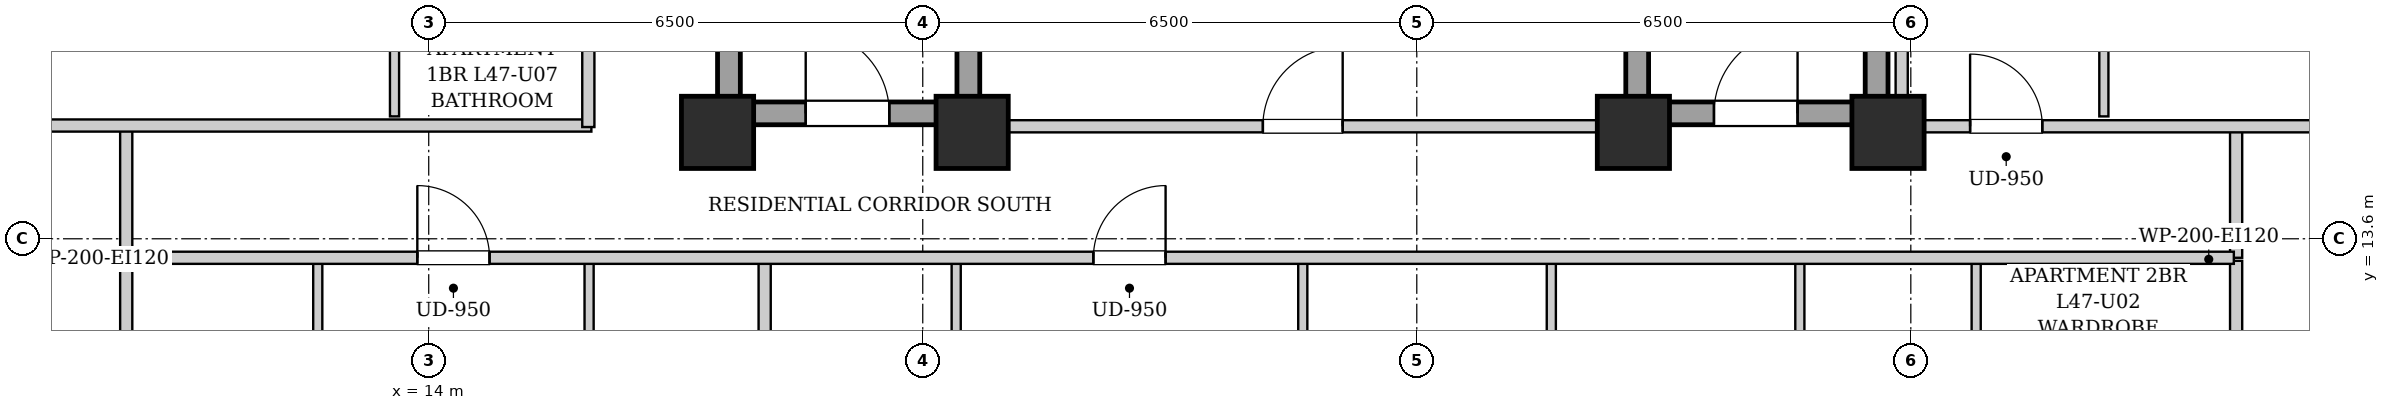
"""IFC4 building model, lengths in metres.
Left out: names, types, materials, properties, quantities, classifications, styles, units other than length and angle.
Written with IfcOpenShell. Run it as: python <this file> out.ifc"""

import sys

from ifc_helpers import new_model, si_unit, direction, frame, frame_2d, origin, origin_2d, place, context, subcontext, project, spatial, rectangle, extrude, element, fill, save


model = new_model("IFC4")
c1 = context("Model", 3, precision=1e-05, world=origin(), true_north=direction((0.0, 1.0)))
c2 = subcontext(c1, "Body", "Model", "MODEL_VIEW")
j1 = project(units=[si_unit("LENGTHUNIT", "METRE"), si_unit("PLANEANGLEUNIT", "RADIAN")], contexts=[c1])
p1 = place(None, origin())
s1 = spatial("IfcSite", under=j1, at=p1, CompositionType="ELEMENT")
p2 = place(p1, origin())
s2 = spatial("IfcBuilding", under=s1, at=p2, CompositionType="ELEMENT")
p3 = place(p2, frame((0.0, 0.0, 163.4)))
s3 = spatial("IfcBuildingStorey", under=s2, at=p3, CompositionType="ELEMENT", Elevation=163.4)
for number, where, z_axis, x_axis in (
    (1, (17.8, 15.0, 0.0), (0.0, 0.0, 1.0), (1.0, 0.0, 0.0)),
    (2, (21.15, 15.0, 0.0), (0.0, 0.0, 1.0), (1.0, 0.0, 0.0)),
    (3, (29.85, 15.0, 0.0), (0.0, 0.0, 1.0), (1.0, 0.0, 0.0)),
    (4, (33.2, 15.0, 0.0), (0.0, 0.0, 1.0), (1.0, 0.0, 0.0)),
):
    element("IfcColumn", number, at=place(p3, frame(where, z_axis=z_axis, x_axis=x_axis)), inside=s3, PredefinedType="COLUMN", context=c2, shape_type="SweptSolid", body=[
        extrude(rectangle(XDim=0.95, YDim=0.95, at=origin_2d()), origin(), (0.0, 0.0, 1.0), 3.25),
    ])
for number, where, z_axis, x_axis in (
    (5, (17.95, 15.1, 0.0), (0.0, 0.0, 1.0), (0.0, 1.0, 0.0)),
    (6, (21.1, 15.1, 0.0), (0.0, 0.0, 1.0), (0.0, 1.0, 0.0)),
):
    element("IfcWall", number, at=place(p3, frame(where, z_axis=z_axis, x_axis=x_axis)), inside=s3, PredefinedType="SHEAR", context=c2, shape_type="SweptSolid", body=[
        extrude(rectangle(XDim=9.0, YDim=0.3, at=frame_2d((4.5, 0.0))), origin(), (0.0, 0.0, 1.0), 2.99),
    ])
p4 = place(p3, frame((18.1, 15.25, 0.0), z_axis=(0.0, 0.0, 1.0), x_axis=(1.0, 0.0, 0.0)))
e7 = element("IfcWall", 7, at=p4, inside=s3, PredefinedType="SHEAR", context=c2, shape_type="SweptSolid", body=[
    extrude(rectangle(XDim=2.85, YDim=0.3, at=frame_2d((1.425, 0.0))), origin(), (0.0, 0.0, 1.0), 2.99),
])
p5 = place(p4, frame((0.86, 0.0, 0.0)))
e8 = element("IfcOpeningElement", 8, at=p5, cuts=e7, PredefinedType="OPENING", context=c2, shape_type="SweptSolid", body=[
    extrude(rectangle(XDim=1.1, YDim=2.05, at=frame_2d((0.55, 1.025))), frame((0.0, 0.16, 0.0), z_axis=(0.0, -1.0, 0.0), x_axis=(1.0, 0.0, 0.0)), (0.0, 0.0, 1.0), 0.32),
])
for number, where, z_axis, x_axis in (
    (9, (29.9, 15.1, 0.0), (0.0, 0.0, 1.0), (0.0, 1.0, 0.0)),
    (10, (33.05, 15.1, 0.0), (0.0, 0.0, 1.0), (0.0, 1.0, 0.0)),
):
    element("IfcWall", number, at=place(p3, frame(where, z_axis=z_axis, x_axis=x_axis)), inside=s3, PredefinedType="SHEAR", context=c2, shape_type="SweptSolid", body=[
        extrude(rectangle(XDim=9.0, YDim=0.3, at=frame_2d((4.5, 0.0))), origin(), (0.0, 0.0, 1.0), 2.99),
    ])
p6 = place(p3, frame((30.05, 15.25, 0.0), z_axis=(0.0, 0.0, 1.0), x_axis=(1.0, 0.0, 0.0)))
e11 = element("IfcWall", 11, at=p6, inside=s3, PredefinedType="SHEAR", context=c2, shape_type="SweptSolid", body=[
    extrude(rectangle(XDim=2.85, YDim=0.3, at=frame_2d((1.425, 0.0))), origin(), (0.0, 0.0, 1.0), 2.99),
])
p7 = place(p6, frame((0.86, 0.0, 0.0)))
e12 = element("IfcOpeningElement", 12, at=p7, cuts=e11, PredefinedType="OPENING", context=c2, shape_type="SweptSolid", body=[
    extrude(rectangle(XDim=1.1, YDim=2.05, at=frame_2d((0.55, 1.025))), frame((0.0, 0.16, 0.0), z_axis=(0.0, -1.0, 0.0), x_axis=(1.0, 0.0, 0.0)), (0.0, 0.0, 1.0), 0.32),
])
p8 = place(p3, frame((21.25, 15.08, 0.0), z_axis=(0.0, 0.0, 1.0), x_axis=(1.0, 0.0, 0.0)))
e13 = element("IfcWall", 13, at=p8, inside=s3, PredefinedType="PARTITIONING", context=c2, shape_type="SweptSolid", body=[
    extrude(rectangle(XDim=8.5, YDim=0.16, at=frame_2d((4.25, 0.0))), origin(), (0.0, 0.0, 1.0), 2.442),
])
p9 = place(p8, frame((3.725, 0.0, 0.0)))
e14 = element("IfcOpeningElement", 14, at=p9, cuts=e13, PredefinedType="OPENING", context=c2, shape_type="SweptSolid", body=[
    extrude(rectangle(XDim=1.05, YDim=2.05, at=frame_2d((0.525, 1.025))), frame((0.0, 0.09, 0.0), z_axis=(0.0, -1.0, 0.0), x_axis=(1.0, 0.0, 0.0)), (0.0, 0.0, 1.0), 0.18),
])
for number, where, z_axis, x_axis in (
    (15, (10.02, 13.35, 0.0), (0.0, 0.0, 1.0), (0.0, 1.0, 0.0)),
    (16, (37.78, 13.35, 0.0), (0.0, 0.0, 1.0), (0.0, 1.0, 0.0)),
):
    element("IfcWall", number, at=place(p3, frame(where, z_axis=z_axis, x_axis=x_axis)), inside=s3, PredefinedType="PARTITIONING", context=c2, shape_type="SweptSolid", body=[
        extrude(rectangle(XDim=1.74, YDim=0.16, at=frame_2d((0.87, 0.0))), origin(), (0.0, 0.0, 1.0), 2.99),
    ])
p10 = place(p3, frame((7.78, 15.09, 0.0), z_axis=(0.0, 0.0, 1.0), x_axis=(1.0, 0.0, 0.0)))
e17 = element("IfcWall", 17, at=p10, inside=s3, PredefinedType="PARTITIONING", context=c2, shape_type="SweptSolid", body=[
    extrude(rectangle(XDim=8.36, YDim=0.16, at=frame_2d((4.18, 0.0))), origin(), (0.0, 0.0, 1.0), 2.442),
])
p11 = place(p3, frame((10.02, 10.4, 0.0), z_axis=(0.0, 0.0, 1.0), x_axis=(0.0, 1.0, 0.0)))
e18 = element("IfcWall", 18, at=p11, inside=s3, PredefinedType="PARTITIONING", context=c2, shape_type="SweptSolid", body=[
    extrude(rectangle(XDim=2.91, YDim=0.16, at=frame_2d((1.455, 0.0))), origin(), (0.0, 0.0, 1.0), 2.99),
])
p12 = place(p3, frame((12.54, 10.46, 0.0), z_axis=(0.0, 0.0, 1.0), x_axis=(0.0, 1.0, 0.0)))
e19 = element("IfcWall", 19, at=p12, inside=s3, PredefinedType="PARTITIONING", context=c2, shape_type="SweptSolid", body=[
    extrude(rectangle(XDim=2.85, YDim=0.12, at=frame_2d((1.425, 0.0))), origin(), (0.0, 0.0, 1.0), 2.99),
])
p13 = place(p12, frame((0.995, 0.0, 0.0)))
e20 = element("IfcOpeningElement", 20, at=p13, cuts=e19, PredefinedType="OPENING", context=c2, shape_type="SweptSolid", body=[
    extrude(rectangle(XDim=0.86, YDim=2.05, at=frame_2d((0.43, 1.025))), frame((0.0, 0.07, 0.0), z_axis=(0.0, -1.0, 0.0), x_axis=(1.0, 0.0, 0.0)), (0.0, 0.0, 1.0), 0.14),
])
p14 = place(p3, frame((16.11, 10.46, 0.0), z_axis=(0.0, 0.0, 1.0), x_axis=(0.0, 1.0, 0.0)))
e21 = element("IfcWall", 21, at=p14, inside=s3, PredefinedType="PARTITIONING", context=c2, shape_type="SweptSolid", body=[
    extrude(rectangle(XDim=2.85, YDim=0.12, at=frame_2d((1.425, 0.0))), origin(), (0.0, 0.0, 1.0), 2.99),
])
p15 = place(p14, frame((0.975, 0.0, 0.0)))
e22 = element("IfcOpeningElement", 22, at=p15, cuts=e21, PredefinedType="OPENING", context=c2, shape_type="SweptSolid", body=[
    extrude(rectangle(XDim=0.9, YDim=2.05, at=frame_2d((0.45, 1.025))), frame((0.0, 0.07, 0.0), z_axis=(0.0, -1.0, 0.0), x_axis=(1.0, 0.0, 0.0)), (0.0, 0.0, 1.0), 0.14),
])
p16 = place(p3, frame((37.78, 10.4, 0.0), z_axis=(0.0, 0.0, 1.0), x_axis=(0.0, 1.0, 0.0)))
e23 = element("IfcWall", 23, at=p16, inside=s3, PredefinedType="PARTITIONING", context=c2, shape_type="SweptSolid", body=[
    extrude(rectangle(XDim=2.91, YDim=0.16, at=frame_2d((1.455, 0.0))), origin(), (0.0, 0.0, 1.0), 2.99),
])
p17 = place(p3, frame((18.42, 4.08, 0.0), z_axis=(0.0, 0.0, 1.0), x_axis=(0.0, 1.0, 0.0)))
e24 = element("IfcWall", 24, at=p17, inside=s3, PredefinedType="PARTITIONING", context=c2, shape_type="SweptSolid", body=[
    extrude(rectangle(XDim=9.23, YDim=0.16, at=frame_2d((4.615, 0.0))), origin(), (0.0, 0.0, 1.0), 2.99),
])
p18 = place(p3, frame((20.94, 10.46, 0.0), z_axis=(0.0, 0.0, 1.0), x_axis=(0.0, 1.0, 0.0)))
e25 = element("IfcWall", 25, at=p18, inside=s3, PredefinedType="PARTITIONING", context=c2, shape_type="SweptSolid", body=[
    extrude(rectangle(XDim=2.85, YDim=0.12, at=frame_2d((1.425, 0.0))), origin(), (0.0, 0.0, 1.0), 2.99),
])
p19 = place(p18, frame((0.995, 0.0, 0.0)))
e26 = element("IfcOpeningElement", 26, at=p19, cuts=e25, PredefinedType="OPENING", context=c2, shape_type="SweptSolid", body=[
    extrude(rectangle(XDim=0.86, YDim=2.05, at=frame_2d((0.43, 1.025))), frame((0.0, 0.07, 0.0), z_axis=(0.0, -1.0, 0.0), x_axis=(1.0, 0.0, 0.0)), (0.0, 0.0, 1.0), 0.14),
])
p20 = place(p3, frame((25.5, 10.46, 0.0), z_axis=(0.0, 0.0, 1.0), x_axis=(0.0, 1.0, 0.0)))
e27 = element("IfcWall", 27, at=p20, inside=s3, PredefinedType="PARTITIONING", context=c2, shape_type="SweptSolid", body=[
    extrude(rectangle(XDim=2.85, YDim=0.12, at=frame_2d((1.425, 0.0))), origin(), (0.0, 0.0, 1.0), 2.99),
])
p21 = place(p20, frame((0.975, 0.0, 0.0)))
e28 = element("IfcOpeningElement", 28, at=p21, cuts=e27, PredefinedType="OPENING", context=c2, shape_type="SweptSolid", body=[
    extrude(rectangle(XDim=0.9, YDim=2.05, at=frame_2d((0.45, 1.025))), frame((0.0, 0.07, 0.0), z_axis=(0.0, -1.0, 0.0), x_axis=(1.0, 0.0, 0.0)), (0.0, 0.0, 1.0), 0.14),
])
p22 = place(p3, frame((28.77, 10.46, 0.0), z_axis=(0.0, 0.0, 1.0), x_axis=(0.0, 1.0, 0.0)))
e29 = element("IfcWall", 29, at=p22, inside=s3, PredefinedType="PARTITIONING", context=c2, shape_type="SweptSolid", body=[
    extrude(rectangle(XDim=2.85, YDim=0.12, at=frame_2d((1.425, 0.0))), origin(), (0.0, 0.0, 1.0), 2.99),
])
p23 = place(p22, frame((0.975, 0.0, 0.0)))
e30 = element("IfcOpeningElement", 30, at=p23, cuts=e29, PredefinedType="OPENING", context=c2, shape_type="SweptSolid", body=[
    extrude(rectangle(XDim=0.9, YDim=2.05, at=frame_2d((0.45, 1.025))), frame((0.0, 0.07, 0.0), z_axis=(0.0, -1.0, 0.0), x_axis=(1.0, 0.0, 0.0)), (0.0, 0.0, 1.0), 0.14),
])
p24 = place(p3, frame((32.04, 10.46, 0.0), z_axis=(0.0, 0.0, 1.0), x_axis=(0.0, 1.0, 0.0)))
e31 = element("IfcWall", 31, at=p24, inside=s3, PredefinedType="PARTITIONING", context=c2, shape_type="SweptSolid", body=[
    extrude(rectangle(XDim=2.85, YDim=0.12, at=frame_2d((1.425, 0.0))), origin(), (0.0, 0.0, 1.0), 2.99),
])
p25 = place(p24, frame((0.975, 0.0, 0.0)))
e32 = element("IfcOpeningElement", 32, at=p25, cuts=e31, PredefinedType="OPENING", context=c2, shape_type="SweptSolid", body=[
    extrude(rectangle(XDim=0.9, YDim=2.05, at=frame_2d((0.45, 1.025))), frame((0.0, 0.07, 0.0), z_axis=(0.0, -1.0, 0.0), x_axis=(1.0, 0.0, 0.0)), (0.0, 0.0, 1.0), 0.14),
])
p26 = place(p3, frame((34.36, 10.46, 0.0), z_axis=(0.0, 0.0, 1.0), x_axis=(0.0, 1.0, 0.0)))
e33 = element("IfcWall", 33, at=p26, inside=s3, PredefinedType="PARTITIONING", context=c2, shape_type="SweptSolid", body=[
    extrude(rectangle(XDim=2.85, YDim=0.12, at=frame_2d((1.425, 0.0))), origin(), (0.0, 0.0, 1.0), 2.99),
])
p27 = place(p26, frame((0.975, 0.0, 0.0)))
e34 = element("IfcOpeningElement", 34, at=p27, cuts=e33, PredefinedType="OPENING", context=c2, shape_type="SweptSolid", body=[
    extrude(rectangle(XDim=0.9, YDim=2.05, at=frame_2d((0.45, 1.025))), frame((0.0, 0.07, 0.0), z_axis=(0.0, -1.0, 0.0), x_axis=(1.0, 0.0, 0.0)), (0.0, 0.0, 1.0), 0.14),
])
p28 = place(p3, frame((13.55, 15.21, 0.0), z_axis=(0.0, 0.0, 1.0), x_axis=(0.0, 1.0, 0.0)))
e35 = element("IfcWall", 35, at=p28, inside=s3, PredefinedType="PARTITIONING", context=c2, shape_type="SweptSolid", body=[
    extrude(rectangle(XDim=2.159, YDim=0.12, at=frame_2d((1.08, 0.0))), origin(), (0.0, 0.0, 1.0), 2.99),
])
p29 = place(p3, frame((33.38, 15.08, 0.0), z_axis=(0.0, 0.0, 1.0), x_axis=(1.0, 0.0, 0.0)))
e36 = element("IfcWall", 36, at=p29, inside=s3, PredefinedType="PARTITIONING", context=c2, shape_type="SweptSolid", body=[
    extrude(rectangle(XDim=6.64, YDim=0.16, at=frame_2d((3.32, 0.0))), origin(), (0.0, 0.0, 1.0), 2.442),
])
p30 = place(p29, frame((0.9, 0.0, 0.0)))
e37 = element("IfcOpeningElement", 37, at=p30, cuts=e36, PredefinedType="OPENING", context=c2, shape_type="SweptSolid", body=[
    extrude(rectangle(XDim=0.95, YDim=2.1, at=frame_2d((0.475, 1.05))), frame((0.0, 0.09, 0.0), z_axis=(0.0, -1.0, 0.0), x_axis=(1.0, 0.0, 0.0)), (0.0, 0.0, 1.0), 0.18),
])
p31 = place(p3, frame((36.04, 15.21, 0.0), z_axis=(0.0, 0.0, 1.0), x_axis=(0.0, 1.0, 0.0)))
e38 = element("IfcWall", 38, at=p31, inside=s3, PredefinedType="PARTITIONING", context=c2, shape_type="SweptSolid", body=[
    extrude(rectangle(XDim=4.5, YDim=0.12, at=frame_2d((2.25, 0.0))), origin(), (0.0, 0.0, 1.0), 2.99),
])
p32 = place(p31, frame((1.8, 0.0, 0.0)))
e39 = element("IfcOpeningElement", 39, at=p32, cuts=e38, PredefinedType="OPENING", context=c2, shape_type="SweptSolid", body=[
    extrude(rectangle(XDim=0.9, YDim=2.05, at=frame_2d((0.45, 1.025))), frame((0.0, 0.07, 0.0), z_axis=(0.0, -1.0, 0.0), x_axis=(1.0, 0.0, 0.0)), (0.0, 0.0, 1.0), 0.14),
])
p33 = place(p3, frame((10.05, 13.35, 0.0), z_axis=(0.0, 0.0, 1.0), x_axis=(1.0, 0.0, 0.0)))
e40 = element("IfcWall", 40, at=p33, inside=s3, PredefinedType="PARTITIONING", context=c2, shape_type="SweptSolid", body=[
    extrude(rectangle(XDim=27.7, YDim=0.16, at=frame_2d((13.85, 0.0))), origin(), (0.0, 0.0, 1.0), 2.99),
])
p34 = place(p33, frame((3.8, 0.0, 0.0)))
e41 = element("IfcOpeningElement", 41, at=p34, cuts=e40, PredefinedType="OPENING", context=c2, shape_type="SweptSolid", body=[
    extrude(rectangle(XDim=0.95, YDim=2.1, at=frame_2d((0.475, 1.05))), frame((0.0, 0.09, 0.0), z_axis=(0.0, -1.0, 0.0), x_axis=(1.0, 0.0, 0.0)), (0.0, 0.0, 1.0), 0.18),
])
p35 = place(p33, frame((12.695, 0.0, 0.0)))
e42 = element("IfcOpeningElement", 42, at=p35, cuts=e40, PredefinedType="OPENING", context=c2, shape_type="SweptSolid", body=[
    extrude(rectangle(XDim=0.95, YDim=2.1, at=frame_2d((0.475, 1.05))), frame((0.0, 0.09, 0.0), z_axis=(0.0, -1.0, 0.0), x_axis=(1.0, 0.0, 0.0)), (0.0, 0.0, 1.0), 0.18),
])
p36 = place(p3, frame((16.1, 15.07, 0.0), z_axis=(0.0, 0.0, 1.0), x_axis=(0.0, 1.0, 0.0)))
e43 = element("IfcWall", 43, at=p36, inside=s3, PredefinedType="PARTITIONING", context=c2, shape_type="SweptSolid", body=[
    extrude(rectangle(XDim=13.93, YDim=0.16, at=frame_2d((6.965, 0.0))), origin(), (0.0, 0.0, 1.0), 2.99),
])
p37 = place(p36, frame((4.661, 0.0, 0.0)))
e44 = element("IfcOpeningElement", 44, at=p37, cuts=e43, PredefinedType="OPENING", context=c2, shape_type="SweptSolid", body=[
    extrude(rectangle(XDim=0.95, YDim=2.1, at=frame_2d((0.475, 1.05))), frame((0.0, 0.09, 0.0), z_axis=(0.0, -1.0, 0.0), x_axis=(1.0, 0.0, 0.0)), (0.0, 0.0, 1.0), 0.18),
])
p38 = place(p36, frame((11.411, 0.0, 0.0)))
e45 = element("IfcOpeningElement", 45, at=p38, cuts=e43, PredefinedType="OPENING", context=c2, shape_type="SweptSolid", body=[
    extrude(rectangle(XDim=0.95, YDim=2.1, at=frame_2d((0.475, 1.05))), frame((0.0, 0.09, 0.0), z_axis=(0.0, -1.0, 0.0), x_axis=(1.0, 0.0, 0.0)), (0.0, 0.0, 1.0), 0.18),
])
p39 = place(p3, frame((33.38, 15.02, 0.0), z_axis=(0.0, 0.0, 1.0), x_axis=(0.0, 1.0, 0.0)))
e46 = element("IfcWall", 46, at=p39, inside=s3, PredefinedType="PARTITIONING", context=c2, shape_type="SweptSolid", body=[
    extrude(rectangle(XDim=13.98, YDim=0.16, at=frame_2d((6.99, 0.0))), origin(), (0.0, 0.0, 1.0), 2.99),
])
p40 = place(p5, origin())
e47 = element("IfcDoor", 47, at=p40, inside=s3, OperationType="SINGLE_SWING_LEFT", PredefinedType="DOOR", context=c2, shape_type="SweptSolid", body=[
    extrude(rectangle(XDim=1.1, YDim=2.05, at=frame_2d((0.55, 1.025))), frame((0.0, 0.025, 0.0), z_axis=(0.0, -1.0, 0.0), x_axis=(1.0, 0.0, 0.0)), (0.0, 0.0, 1.0), 0.05),
])
fill(e8, e47)
p41 = place(p7, origin())
e48 = element("IfcDoor", 48, at=p41, inside=s3, OperationType="SINGLE_SWING_RIGHT", PredefinedType="DOOR", context=c2, shape_type="SweptSolid", body=[
    extrude(rectangle(XDim=1.1, YDim=2.05, at=frame_2d((0.55, 1.025))), frame((0.0, 0.025, 0.0), z_axis=(0.0, -1.0, 0.0), x_axis=(1.0, 0.0, 0.0)), (0.0, 0.0, 1.0), 0.05),
])
fill(e12, e48)
p42 = place(p9, origin())
e49 = element("IfcDoor", 49, at=p42, inside=s3, OperationType="SINGLE_SWING_RIGHT", PredefinedType="DOOR", context=c2, shape_type="SweptSolid", body=[
    extrude(rectangle(XDim=1.05, YDim=2.05, at=frame_2d((0.525, 1.025))), frame((0.0, 0.025, 0.0), z_axis=(0.0, -1.0, 0.0), x_axis=(1.0, 0.0, 0.0)), (0.0, 0.0, 1.0), 0.05),
])
fill(e14, e49)
p43 = place(p30, origin())
e50 = element("IfcDoor", 50, at=p43, inside=s3, OperationType="SINGLE_SWING_LEFT", PredefinedType="DOOR", context=c2, shape_type="SweptSolid", body=[
    extrude(rectangle(XDim=0.95, YDim=2.1, at=frame_2d((0.475, 1.05))), frame((0.0, 0.025, 0.0), z_axis=(0.0, -1.0, 0.0), x_axis=(1.0, 0.0, 0.0)), (0.0, 0.0, 1.0), 0.05),
])
fill(e37, e50)
p44 = place(p34, origin())
e51 = element("IfcDoor", 51, at=p44, inside=s3, OperationType="SINGLE_SWING_LEFT", PredefinedType="DOOR", context=c2, shape_type="SweptSolid", body=[
    extrude(rectangle(XDim=0.95, YDim=2.1, at=frame_2d((0.475, 1.05))), frame((0.0, 0.025, 0.0), z_axis=(0.0, -1.0, 0.0), x_axis=(1.0, 0.0, 0.0)), (0.0, 0.0, 1.0), 0.05),
])
fill(e41, e51)
p45 = place(p35, origin())
e52 = element("IfcDoor", 52, at=p45, inside=s3, OperationType="SINGLE_SWING_RIGHT", PredefinedType="DOOR", context=c2, shape_type="SweptSolid", body=[
    extrude(rectangle(XDim=0.95, YDim=2.1, at=frame_2d((0.475, 1.05))), frame((0.0, 0.025, 0.0), z_axis=(0.0, -1.0, 0.0), x_axis=(1.0, 0.0, 0.0)), (0.0, 0.0, 1.0), 0.05),
])
fill(e42, e52)
save(model, sys.argv[1])
